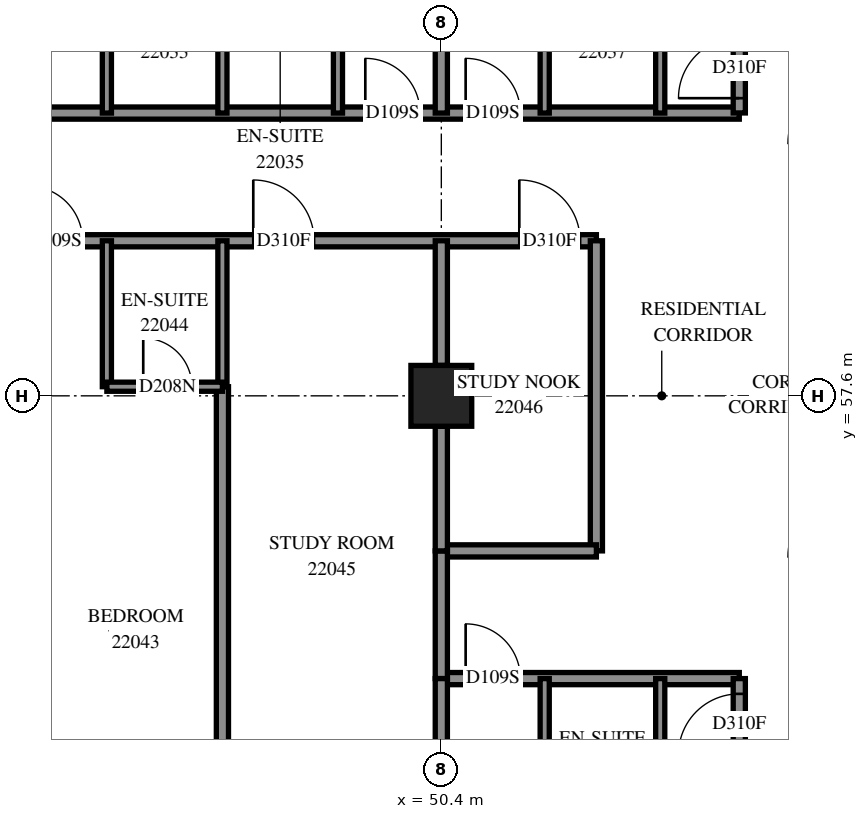
"""IFC4 building model, lengths in metres.
Left out: names, types, materials, properties, quantities, classifications, styles, units other than length and angle.
Written with IfcOpenShell. Run it as: python <this file> out.ifc"""

import sys

from ifc_helpers import new_model, si_unit, direction, frame, frame_2d, origin, origin_2d, place, context, subcontext, project, spatial, rectangle, extrude, element, fill, save


model = new_model("IFC4")
c1 = context("Model", 3, precision=1e-05, world=origin(), true_north=direction((0.0, 1.0)))
c2 = subcontext(c1, "Body", "Model", "MODEL_VIEW")
j1 = project(units=[si_unit("LENGTHUNIT", "METRE"), si_unit("PLANEANGLEUNIT", "RADIAN")], contexts=[c1])
p1 = place(None, origin())
s1 = spatial("IfcSite", under=j1, at=p1, CompositionType="ELEMENT")
p2 = place(p1, origin())
s2 = spatial("IfcBuilding", under=s1, at=p2, CompositionType="ELEMENT")
p3 = place(p2, frame((0.0, 0.0, 84.6)))
s3 = spatial("IfcBuildingStorey", under=s2, at=p3, CompositionType="ELEMENT", Elevation=84.6)
p4 = place(p3, frame((50.4, 57.6, 0.0), z_axis=(0.0, 0.0, 1.0), x_axis=(1.0, 0.0, 0.0)))
e1 = element("IfcColumn", 1, at=p4, inside=s3, PredefinedType="COLUMN", context=c2, shape_type="SweptSolid", body=[
    extrude(rectangle(XDim=1.0, YDim=1.0, at=origin_2d()), origin(), (0.0, 0.0, 1.0), 3.1),
])
p5 = place(p3, frame((28.8, 60.15, 0.0), z_axis=(0.0, 0.0, 1.0), x_axis=(1.0, 0.0, 0.0)))
e2 = element("IfcWall", 2, at=p5, inside=s3, PredefinedType="PARTITIONING", context=c2, shape_type="SweptSolid", body=[
    extrude(rectangle(XDim=24.15, YDim=0.2, at=frame_2d((12.075, 0.0))), origin(), (0.0, 0.0, 1.0), 3.1),
])
p6 = place(p5, frame((11.325, 0.0, 0.0)))
e3 = element("IfcOpeningElement", 3, at=p6, cuts=e2, PredefinedType="OPENING", context=c2, shape_type="SweptSolid", body=[
    extrude(rectangle(XDim=1.0, YDim=2.1, at=frame_2d((0.5, 1.05))), frame((0.0, 0.11, 0.0), z_axis=(0.0, -1.0, 0.0), x_axis=(1.0, 0.0, 0.0)), (0.0, 0.0, 1.0), 0.22),
])
p7 = place(p5, frame((14.8, 0.0, 0.0)))
e4 = element("IfcOpeningElement", 4, at=p7, cuts=e2, PredefinedType="OPENING", context=c2, shape_type="SweptSolid", body=[
    extrude(rectangle(XDim=0.9, YDim=2.1, at=frame_2d((0.45, 1.05))), frame((0.0, 0.11, 0.0), z_axis=(0.0, -1.0, 0.0), x_axis=(1.0, 0.0, 0.0)), (0.0, 0.0, 1.0), 0.22),
])
p8 = place(p5, frame((18.508, 0.0, 0.0)))
e5 = element("IfcOpeningElement", 5, at=p8, cuts=e2, PredefinedType="OPENING", context=c2, shape_type="SweptSolid", body=[
    extrude(rectangle(XDim=1.0, YDim=2.1, at=frame_2d((0.5, 1.05))), frame((0.0, 0.11, 0.0), z_axis=(0.0, -1.0, 0.0), x_axis=(1.0, 0.0, 0.0)), (0.0, 0.0, 1.0), 0.22),
])
p9 = place(p5, frame((22.882, 0.0, 0.0)))
e6 = element("IfcOpeningElement", 6, at=p9, cuts=e2, PredefinedType="OPENING", context=c2, shape_type="SweptSolid", body=[
    extrude(rectangle(XDim=1.0, YDim=2.1, at=frame_2d((0.5, 1.05))), frame((0.0, 0.11, 0.0), z_axis=(0.0, -1.0, 0.0), x_axis=(1.0, 0.0, 0.0)), (0.0, 0.0, 1.0), 0.22),
])
p10 = place(p3, frame((33.45, 62.25, 0.0), z_axis=(0.0, 0.0, 1.0), x_axis=(1.0, 0.0, 0.0)))
e7 = element("IfcWall", 7, at=p10, inside=s3, PredefinedType="PARTITIONING", context=c2, shape_type="SweptSolid", body=[
    extrude(rectangle(XDim=21.85, YDim=0.2, at=frame_2d((10.925, 0.0))), origin(), (0.0, 0.0, 1.0), 3.1),
])
p11 = place(p10, frame((0.144, 0.0, 0.0)))
e8 = element("IfcOpeningElement", 8, at=p11, cuts=e7, PredefinedType="OPENING", context=c2, shape_type="SweptSolid", body=[
    extrude(rectangle(XDim=1.0, YDim=2.1, at=frame_2d((0.5, 1.05))), frame((0.0, 0.11, 0.0), z_axis=(0.0, -1.0, 0.0), x_axis=(1.0, 0.0, 0.0)), (0.0, 0.0, 1.0), 0.22),
])
p12 = place(p10, frame((2.95, 0.0, 0.0)))
e9 = element("IfcOpeningElement", 9, at=p12, cuts=e7, PredefinedType="OPENING", context=c2, shape_type="SweptSolid", body=[
    extrude(rectangle(XDim=0.9, YDim=2.1, at=frame_2d((0.45, 1.05))), frame((0.0, 0.11, 0.0), z_axis=(0.0, -1.0, 0.0), x_axis=(1.0, 0.0, 0.0)), (0.0, 0.0, 1.0), 0.22),
])
p13 = place(p10, frame((8.407, 0.0, 0.0)))
e10 = element("IfcOpeningElement", 10, at=p13, cuts=e7, PredefinedType="OPENING", context=c2, shape_type="SweptSolid", body=[
    extrude(rectangle(XDim=0.9, YDim=2.1, at=frame_2d((0.45, 1.05))), frame((0.0, 0.11, 0.0), z_axis=(0.0, -1.0, 0.0), x_axis=(1.0, 0.0, 0.0)), (0.0, 0.0, 1.0), 0.22),
])
p14 = place(p10, frame((15.7, 0.0, 0.0)))
e11 = element("IfcOpeningElement", 11, at=p14, cuts=e7, PredefinedType="OPENING", context=c2, shape_type="SweptSolid", body=[
    extrude(rectangle(XDim=0.9, YDim=2.1, at=frame_2d((0.45, 1.05))), frame((0.0, 0.11, 0.0), z_axis=(0.0, -1.0, 0.0), x_axis=(1.0, 0.0, 0.0)), (0.0, 0.0, 1.0), 0.22),
])
p15 = place(p10, frame((17.35, 0.0, 0.0)))
e12 = element("IfcOpeningElement", 12, at=p15, cuts=e7, PredefinedType="OPENING", context=c2, shape_type="SweptSolid", body=[
    extrude(rectangle(XDim=0.9, YDim=2.1, at=frame_2d((0.45, 1.05))), frame((0.0, 0.11, 0.0), z_axis=(0.0, -1.0, 0.0), x_axis=(1.0, 0.0, 0.0)), (0.0, 0.0, 1.0), 0.22),
])
p16 = place(p3, frame((46.8, 49.75, 0.0), z_axis=(0.0, 0.0, 1.0), x_axis=(0.0, 1.0, 0.0)))
e13 = element("IfcWall", 13, at=p16, inside=s3, PredefinedType="PARTITIONING", context=c2, shape_type="SweptSolid", body=[
    extrude(rectangle(XDim=8.0, YDim=0.2, at=frame_2d((4.0, 0.0))), origin(), (0.0, 0.0, 1.0), 3.1),
])
p17 = place(p3, frame((52.95, 55.05, 0.0), z_axis=(0.0, 0.0, 1.0), x_axis=(0.0, 1.0, 0.0)))
e14 = element("IfcWall", 14, at=p17, inside=s3, PredefinedType="PARTITIONING", context=c2, shape_type="SweptSolid", body=[
    extrude(rectangle(XDim=5.1, YDim=0.2, at=frame_2d((2.55, 0.0))), origin(), (0.0, 0.0, 1.0), 3.1),
])
p18 = place(p3, frame((50.4, 52.95, 0.0), z_axis=(0.0, 0.0, 1.0), x_axis=(1.0, 0.0, 0.0)))
e15 = element("IfcWall", 15, at=p18, inside=s3, PredefinedType="PARTITIONING", context=c2, shape_type="SweptSolid", body=[
    extrude(rectangle(XDim=4.9, YDim=0.2, at=frame_2d((2.45, 0.0))), origin(), (0.0, 0.0, 1.0), 3.1),
])
p19 = place(p18, frame((0.4, 0.0, 0.0)))
e16 = element("IfcOpeningElement", 16, at=p19, cuts=e15, PredefinedType="OPENING", context=c2, shape_type="SweptSolid", body=[
    extrude(rectangle(XDim=0.9, YDim=2.1, at=frame_2d((0.45, 1.05))), frame((0.0, 0.11, 0.0), z_axis=(0.0, -1.0, 0.0), x_axis=(1.0, 0.0, 0.0)), (0.0, 0.0, 1.0), 0.22),
])
p20 = place(p3, frame((55.3, 48.1, 0.0), z_axis=(0.0, 0.0, 1.0), x_axis=(0.0, 1.0, 0.0)))
e17 = element("IfcWall", 17, at=p20, inside=s3, PredefinedType="PARTITIONING", context=c2, shape_type="SweptSolid", body=[
    extrude(rectangle(XDim=4.85, YDim=0.2, at=frame_2d((2.425, 0.0))), origin(), (0.0, 0.0, 1.0), 3.1),
])
p21 = place(p20, frame((3.599, 0.0, 0.0)))
e18 = element("IfcOpeningElement", 18, at=p21, cuts=e17, PredefinedType="OPENING", context=c2, shape_type="SweptSolid", body=[
    extrude(rectangle(XDim=1.0, YDim=2.1, at=frame_2d((0.5, 1.05))), frame((0.0, 0.11, 0.0), z_axis=(0.0, -1.0, 0.0), x_axis=(1.0, 0.0, 0.0)), (0.0, 0.0, 1.0), 0.22),
])
p22 = place(p3, frame((55.3, 62.252, 0.0), z_axis=(0.0, 0.0, 1.0), x_axis=(0.0, 1.0, 0.0)))
e19 = element("IfcWall", 19, at=p22, inside=s3, PredefinedType="PARTITIONING", context=c2, shape_type="SweptSolid", body=[
    extrude(rectangle(XDim=4.848, YDim=0.2, at=frame_2d((2.424, 0.0))), origin(), (0.0, 0.0, 1.0), 3.1),
])
p23 = place(p22, frame((0.243, 0.0, 0.0)))
e20 = element("IfcOpeningElement", 20, at=p23, cuts=e19, PredefinedType="OPENING", context=c2, shape_type="SweptSolid", body=[
    extrude(rectangle(XDim=1.0, YDim=2.1, at=frame_2d((0.5, 1.05))), frame((0.0, 0.11, 0.0), z_axis=(0.0, -1.0, 0.0), x_axis=(1.0, 0.0, 0.0)), (0.0, 0.0, 1.0), 0.22),
])
p24 = place(p3, frame((50.4, 55.05, 0.0), z_axis=(0.0, 0.0, 1.0), x_axis=(1.0, 0.0, 0.0)))
e21 = element("IfcWall", 21, at=p24, inside=s3, PredefinedType="PARTITIONING", context=c2, shape_type="SweptSolid", body=[
    extrude(rectangle(XDim=2.55, YDim=0.2, at=frame_2d((1.275, 0.0))), origin(), (0.0, 0.0, 1.0), 3.1),
])
for number, where, z_axis, x_axis in (
    (22, (44.9, 62.25, 0.0), (0.0, 0.0, 1.0), (0.0, 1.0, 0.0)),
    (23, (46.8, 62.25, 0.0), (0.0, 0.0, 1.0), (0.0, 1.0, 0.0)),
    (24, (48.7, 62.25, 0.0), (0.0, 0.0, 1.0), (0.0, 1.0, 0.0)),
    (25, (52.1, 50.55, 0.0), (0.0, 0.0, 1.0), (0.0, 1.0, 0.0)),
    (26, (52.1, 62.25, 0.0), (0.0, 0.0, 1.0), (0.0, 1.0, 0.0)),
    (27, (54.0, 50.55, 0.0), (0.0, 0.0, 1.0), (0.0, 1.0, 0.0)),
    (28, (54.0, 62.25, 0.0), (0.0, 0.0, 1.0), (0.0, 1.0, 0.0)),
    (29, (44.9, 57.75, 0.0), (0.0, 0.0, 1.0), (0.0, 1.0, 0.0)),
    (30, (46.8, 57.75, 0.0), (0.0, 0.0, 1.0), (0.0, 1.0, 0.0)),
):
    element("IfcWall", number, at=place(p3, frame(where, z_axis=z_axis, x_axis=x_axis)), inside=s3, PredefinedType="PARTITIONING", context=c2, shape_type="SweptSolid", body=[
        extrude(rectangle(XDim=2.4, YDim=0.15, at=frame_2d((1.2, 0.0))), origin(), (0.0, 0.0, 1.0), 3.1),
    ])
p25 = place(p3, frame((50.4, 52.95, 0.0), z_axis=(0.0, 0.0, 1.0), x_axis=(0.0, 1.0, 0.0)))
e31 = element("IfcWall", 31, at=p25, inside=s3, PredefinedType="PARTITIONING", context=c2, shape_type="SweptSolid", body=[
    extrude(rectangle(XDim=2.1, YDim=0.2, at=frame_2d((1.05, 0.0))), origin(), (0.0, 0.0, 1.0), 3.1),
])
for number, where, z_axis, x_axis in (
    (32, (50.4, 50.9, 0.0), (0.0, 0.0, 1.0), (0.0, 1.0, 0.0)),
    (33, (50.4, 55.05, 0.0), (0.0, 0.0, 1.0), (0.0, 1.0, 0.0)),
    (34, (50.4, 58.1, 0.0), (0.0, 0.0, 1.0), (0.0, 1.0, 0.0)),
    (35, (50.4, 62.25, 0.0), (0.0, 0.0, 1.0), (0.0, 1.0, 0.0)),
):
    element("IfcWall", number, at=place(p3, frame(where, z_axis=z_axis, x_axis=x_axis)), inside=s3, PredefinedType="PARTITIONING", context=c2, shape_type="SweptSolid", body=[
        extrude(rectangle(XDim=2.05, YDim=0.2, at=frame_2d((1.025, 0.0))), origin(), (0.0, 0.0, 1.0), 3.1),
    ])
p26 = place(p3, frame((44.9, 57.75, 0.0), z_axis=(0.0, 0.0, 1.0), x_axis=(1.0, 0.0, 0.0)))
e36 = element("IfcWall", 36, at=p26, inside=s3, PredefinedType="PARTITIONING", context=c2, shape_type="SweptSolid", body=[
    extrude(rectangle(XDim=1.9, YDim=0.15, at=frame_2d((0.95, 0.0))), origin(), (0.0, 0.0, 1.0), 3.1),
])
p27 = place(p26, frame((0.598, 0.0, 0.0)))
e37 = element("IfcOpeningElement", 37, at=p27, cuts=e36, PredefinedType="OPENING", context=c2, shape_type="SweptSolid", body=[
    extrude(rectangle(XDim=0.8, YDim=2.1, at=frame_2d((0.4, 1.05))), frame((0.0, 0.085, 0.0), z_axis=(0.0, -1.0, 0.0), x_axis=(1.0, 0.0, 0.0)), (0.0, 0.0, 1.0), 0.17),
])
p28 = place(p14, origin())
e38 = element("IfcDoor", 38, at=p28, inside=s3, OperationType="SINGLE_SWING_LEFT", PredefinedType="DOOR", context=c2, shape_type="SweptSolid", body=[
    extrude(rectangle(XDim=0.9, YDim=2.1, at=frame_2d((0.45, 1.05))), frame((0.0, 0.025, 0.0), z_axis=(0.0, -1.0, 0.0), x_axis=(1.0, 0.0, 0.0)), (0.0, 0.0, 1.0), 0.05),
])
fill(e11, e38)
p29 = place(p15, origin())
e39 = element("IfcDoor", 39, at=p29, inside=s3, OperationType="SINGLE_SWING_RIGHT", PredefinedType="DOOR", context=c2, shape_type="SweptSolid", body=[
    extrude(rectangle(XDim=0.9, YDim=2.1, at=frame_2d((0.45, 1.05))), frame((0.0, 0.025, 0.0), z_axis=(0.0, -1.0, 0.0), x_axis=(1.0, 0.0, 0.0)), (0.0, 0.0, 1.0), 0.05),
])
fill(e12, e39)
p30 = place(p23, origin())
e40 = element("IfcDoor", 40, at=p30, inside=s3, OperationType="SINGLE_SWING_LEFT", PredefinedType="DOOR", context=c2, shape_type="SweptSolid", body=[
    extrude(rectangle(XDim=1.0, YDim=2.1, at=frame_2d((0.5, 1.05))), frame((0.0, 0.025, 0.0), z_axis=(0.0, -1.0, 0.0), x_axis=(1.0, 0.0, 0.0)), (0.0, 0.0, 1.0), 0.05),
])
fill(e20, e40)
p31 = place(p7, origin())
e41 = element("IfcDoor", 41, at=p31, inside=s3, OperationType="SINGLE_SWING_LEFT", PredefinedType="DOOR", context=c2, shape_type="SweptSolid", body=[
    extrude(rectangle(XDim=0.9, YDim=2.1, at=frame_2d((0.45, 1.05))), frame((0.0, 0.025, 0.0), z_axis=(0.0, -1.0, 0.0), x_axis=(1.0, 0.0, 0.0)), (0.0, 0.0, 1.0), 0.05),
])
fill(e4, e41)
p32 = place(p27, origin())
e42 = element("IfcDoor", 42, at=p32, inside=s3, OperationType="SINGLE_SWING_RIGHT", PredefinedType="DOOR", context=c2, shape_type="SweptSolid", body=[
    extrude(rectangle(XDim=0.8, YDim=2.1, at=frame_2d((0.4, 1.05))), frame((0.0, 0.025, 0.0), z_axis=(0.0, -1.0, 0.0), x_axis=(1.0, 0.0, 0.0)), (0.0, 0.0, 1.0), 0.05),
])
fill(e37, e42)
p33 = place(p8, origin())
e43 = element("IfcDoor", 43, at=p33, inside=s3, OperationType="SINGLE_SWING_RIGHT", PredefinedType="DOOR", context=c2, shape_type="SweptSolid", body=[
    extrude(rectangle(XDim=1.0, YDim=2.1, at=frame_2d((0.5, 1.05))), frame((0.0, 0.025, 0.0), z_axis=(0.0, -1.0, 0.0), x_axis=(1.0, 0.0, 0.0)), (0.0, 0.0, 1.0), 0.05),
])
fill(e5, e43)
p34 = place(p9, origin())
e44 = element("IfcDoor", 44, at=p34, inside=s3, OperationType="SINGLE_SWING_LEFT", PredefinedType="DOOR", context=c2, shape_type="SweptSolid", body=[
    extrude(rectangle(XDim=1.0, YDim=2.1, at=frame_2d((0.5, 1.05))), frame((0.0, 0.025, 0.0), z_axis=(0.0, -1.0, 0.0), x_axis=(1.0, 0.0, 0.0)), (0.0, 0.0, 1.0), 0.05),
])
fill(e6, e44)
p35 = place(p19, origin())
e45 = element("IfcDoor", 45, at=p35, inside=s3, OperationType="SINGLE_SWING_LEFT", PredefinedType="DOOR", context=c2, shape_type="SweptSolid", body=[
    extrude(rectangle(XDim=0.9, YDim=2.1, at=frame_2d((0.45, 1.05))), frame((0.0, 0.025, 0.0), z_axis=(0.0, -1.0, 0.0), x_axis=(1.0, 0.0, 0.0)), (0.0, 0.0, 1.0), 0.05),
])
fill(e16, e45)
p36 = place(p21, origin())
e46 = element("IfcDoor", 46, at=p36, inside=s3, OperationType="SINGLE_SWING_RIGHT", PredefinedType="DOOR", context=c2, shape_type="SweptSolid", body=[
    extrude(rectangle(XDim=1.0, YDim=2.1, at=frame_2d((0.5, 1.05))), frame((0.0, 0.025, 0.0), z_axis=(0.0, -1.0, 0.0), x_axis=(1.0, 0.0, 0.0)), (0.0, 0.0, 1.0), 0.05),
])
fill(e18, e46)
save(model, sys.argv[1])
